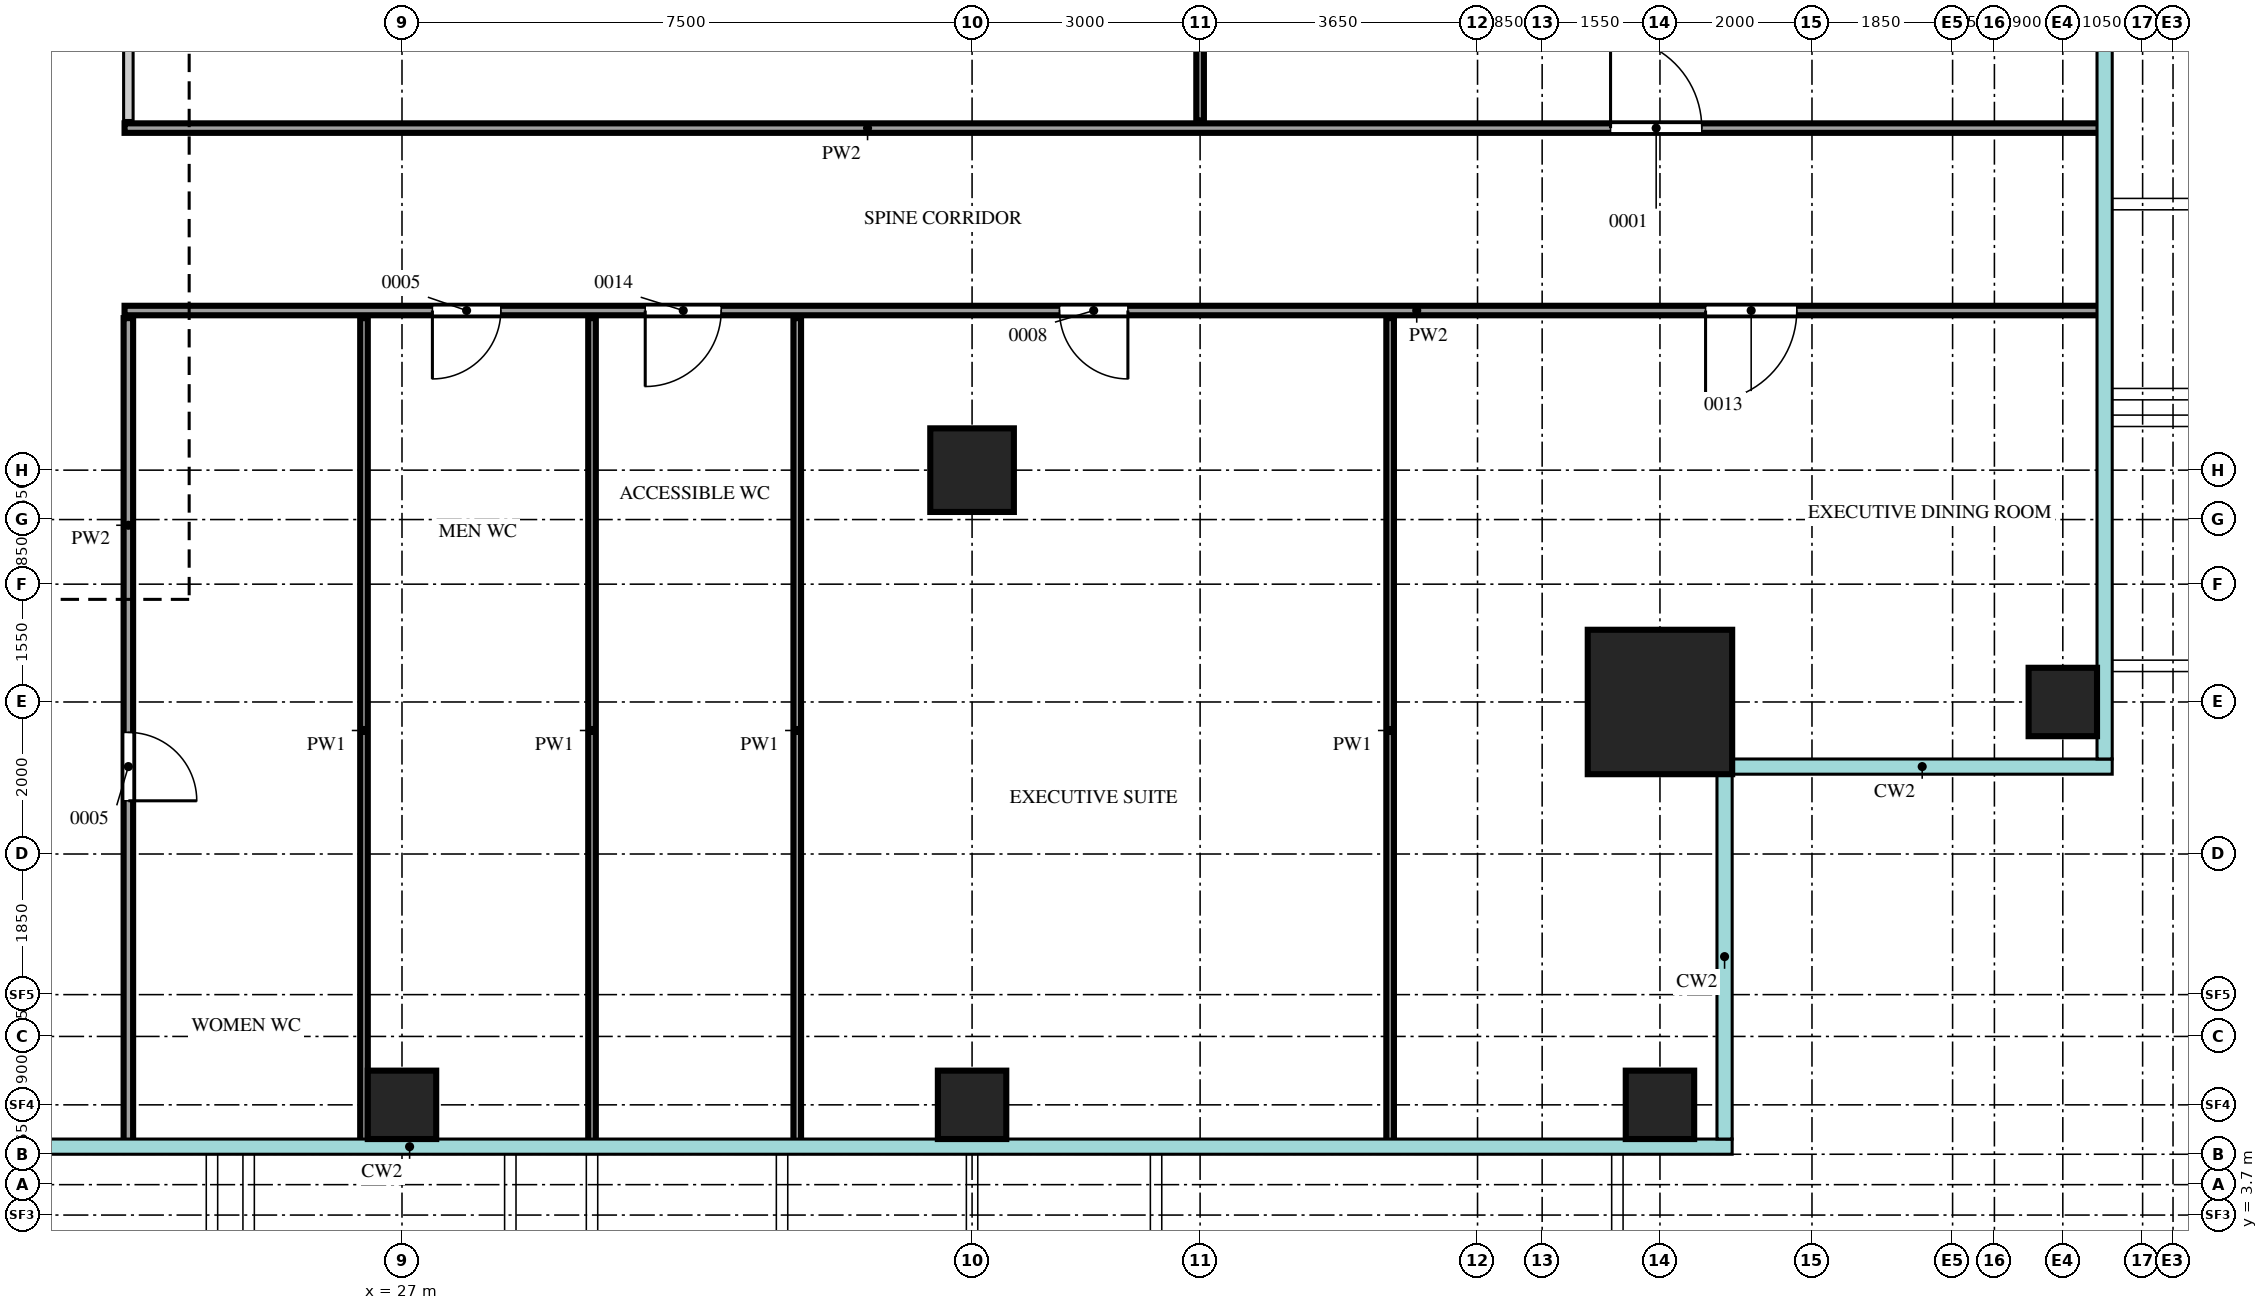
"""IFC4 building model, lengths in metres.
Left out: names, types, materials, properties, quantities, classifications, styles, units other than length and angle.
Written with IfcOpenShell. Run it as: python <this file> out.ifc"""

import sys

from ifc_helpers import new_model, si_unit, direction, frame, frame_2d, origin, origin_2d, place, context, subcontext, project, spatial, rectangle, extrude, source, transform, mapped, element, fill, save


model = new_model("IFC4")
c1 = context("Model", 3, precision=1e-05, world=origin(), true_north=direction((0.0, 1.0)))
c2 = subcontext(c1, "Body", "Model", "MODEL_VIEW")
j1 = project(units=[si_unit("LENGTHUNIT", "METRE"), si_unit("PLANEANGLEUNIT", "RADIAN")], contexts=[c1])
p1 = place(None, origin())
s1 = spatial("IfcSite", under=j1, at=p1, CompositionType="ELEMENT")
p2 = place(p1, origin())
s2 = spatial("IfcBuilding", under=s1, at=p2, CompositionType="ELEMENT")
p3 = place(p2, frame((0.0, 0.0, 266.2)))
s3 = spatial("IfcBuildingStorey", under=s2, at=p3, CompositionType="ELEMENT", Elevation=266.2)
m1 = source(origin(), c2, "Body", "SweptSolid", [
    extrude(rectangle(XDim=1.9, YDim=1.9, at=origin_2d()), origin(), (0.0, 0.0, 1.0), 4.0),
])
p4 = place(p3, frame((43.55, 10.45, 0.0), z_axis=(0.0, 0.0, 1.0), x_axis=(1.0, 0.0, 0.0)))
e1 = element("IfcColumn", 1, at=p4, inside=s3, PredefinedType="COLUMN", context=c2, shape_type="MappedRepresentation", body=[
    mapped(m1, transform((0.0, 0.0, 0.0))),
])
m2 = source(origin(), c2, "Body", "SweptSolid", [
    extrude(rectangle(XDim=0.9, YDim=0.9, at=origin_2d()), origin(), (0.0, 0.0, 1.0), 3.75),
])
for number, where, z_axis, x_axis in (
    (2, (27.0, 5.15, 0.0), (0.0, 0.0, 1.0), (1.0, 0.0, 0.0)),
    (3, (34.5, 5.15, 0.0), (0.0, 0.0, 1.0), (1.0, 0.0, 0.0)),
    (4, (43.55, 5.15, 0.0), (0.0, 0.0, 1.0), (1.0, 0.0, 0.0)),
    (5, (48.85, 10.45, 0.0), (0.0, 0.0, 1.0), (1.0, 0.0, 0.0)),
):
    element("IfcColumn", number, at=place(p3, frame(where, z_axis=z_axis, x_axis=x_axis)), inside=s3, PredefinedType="COLUMN", context=c2, shape_type="MappedRepresentation", body=[
        mapped(m2, transform((0.0, 0.0, 0.0))),
    ])
m3 = source(origin(), c2, "Body", "SweptSolid", [
    extrude(rectangle(XDim=1.1, YDim=1.1, at=origin_2d()), origin(), (0.0, 0.0, 1.0), 3.75),
])
p5 = place(p3, frame((34.5, 13.5, 0.0), z_axis=(0.0, 0.0, 1.0), x_axis=(1.0, 0.0, 0.0)))
e6 = element("IfcColumn", 6, at=p5, inside=s3, PredefinedType="COLUMN", context=c2, shape_type="MappedRepresentation", body=[
    mapped(m3, transform((0.0, 0.0, 0.0))),
])
m4 = source(origin(), c2, "Body", "SweptSolid", [
    extrude(rectangle(XDim=10.85, YDim=0.125, at=frame_2d((5.425, 0.0))), origin(), (0.0, 0.0, 1.0), 3.8),
])
p6 = place(p3, frame((23.4, 4.65, 0.0), z_axis=(0.0, 0.0, 1.0), x_axis=(0.0, 1.0, 0.0)))
e7 = element("IfcWall", 7, at=p6, inside=s3, PredefinedType="PARTITIONING", context=c2, shape_type="MappedRepresentation", body=[
    mapped(m4, transform((0.0, 0.0, 0.0))),
])
m5 = source(origin(), c2, "Body", "SweptSolid", [
    extrude(rectangle(XDim=0.9, YDim=2.1, at=frame_2d((0.45, 1.05))), frame((0.0, 0.073, 0.0), z_axis=(0.0, -1.0, 0.0), x_axis=(1.0, 0.0, 0.0)), (0.0, 0.0, 1.0), 0.145),
])
p7 = place(p6, frame((4.5, 0.0, 0.0)))
e8 = element("IfcOpeningElement", 8, at=p7, cuts=e7, PredefinedType="OPENING", context=c2, shape_type="MappedRepresentation", body=[
    mapped(m5, transform((0.0, 0.0, 0.0))),
])
m6 = source(origin(), c2, "Body", "SweptSolid", [
    extrude(rectangle(XDim=10.85, YDim=0.1, at=frame_2d((5.425, 0.0))), origin(), (0.0, 0.0, 1.0), 3.8),
])
for number, where, z_axis, x_axis in (
    (9, (26.5, 4.65, 0.0), (0.0, 0.0, 1.0), (0.0, 1.0, 0.0)),
    (10, (29.5, 4.65, 0.0), (0.0, 0.0, 1.0), (0.0, 1.0, 0.0)),
    (11, (32.2, 4.65, 0.0), (0.0, 0.0, 1.0), (0.0, 1.0, 0.0)),
    (12, (40.0, 4.65, 0.0), (0.0, 0.0, 1.0), (0.0, 1.0, 0.0)),
):
    element("IfcWall", number, at=place(p3, frame(where, z_axis=z_axis, x_axis=x_axis)), inside=s3, PredefinedType="PARTITIONING", context=c2, shape_type="MappedRepresentation", body=[
        mapped(m6, transform((0.0, 0.0, 0.0))),
    ])
m7 = source(origin(), c2, "Body", "SweptSolid", [
    extrude(rectangle(XDim=26.0, YDim=0.125, at=frame_2d((13.0, 0.0))), origin(), (0.0, 0.0, 1.0), 3.8),
])
p8 = place(p3, frame((23.35, 15.6, 0.0), z_axis=(0.0, 0.0, 1.0), x_axis=(1.0, 0.0, 0.0)))
e13 = element("IfcWall", 13, at=p8, inside=s3, PredefinedType="PARTITIONING", context=c2, shape_type="MappedRepresentation", body=[
    mapped(m7, transform((0.0, 0.0, 0.0))),
])
p9 = place(p8, frame((4.05, 0.0, 0.0)))
e14 = element("IfcOpeningElement", 14, at=p9, cuts=e13, PredefinedType="OPENING", context=c2, shape_type="MappedRepresentation", body=[
    mapped(m5, transform((0.0, 0.0, 0.0))),
])
m8 = source(origin(), c2, "Body", "SweptSolid", [
    extrude(rectangle(XDim=1.0, YDim=2.1, at=frame_2d((0.5, 1.05))), frame((0.0, 0.073, 0.0), z_axis=(0.0, -1.0, 0.0), x_axis=(1.0, 0.0, 0.0)), (0.0, 0.0, 1.0), 0.145),
])
p10 = place(p8, frame((6.85, 0.0, 0.0)))
e15 = element("IfcOpeningElement", 15, at=p10, cuts=e13, PredefinedType="OPENING", context=c2, shape_type="MappedRepresentation", body=[
    mapped(m8, transform((0.0, 0.0, 0.0))),
])
p11 = place(p8, frame((12.3, 0.0, 0.0)))
e16 = element("IfcOpeningElement", 16, at=p11, cuts=e13, PredefinedType="OPENING", context=c2, shape_type="MappedRepresentation", body=[
    mapped(m5, transform((0.0, 0.0, 0.0))),
])
m9 = source(origin(), c2, "Body", "SweptSolid", [
    extrude(rectangle(XDim=1.2, YDim=2.1, at=frame_2d((0.6, 1.05))), frame((0.0, 0.073, 0.0), z_axis=(0.0, -1.0, 0.0), x_axis=(1.0, 0.0, 0.0)), (0.0, 0.0, 1.0), 0.145),
])
p12 = place(p8, frame((20.8, 0.0, 0.0)))
e17 = element("IfcOpeningElement", 17, at=p12, cuts=e13, PredefinedType="OPENING", context=c2, shape_type="MappedRepresentation", body=[
    mapped(m9, transform((0.0, 0.0, 0.0))),
])
p13 = place(p3, frame((23.35, 18.0, 0.0), z_axis=(0.0, 0.0, 1.0), x_axis=(1.0, 0.0, 0.0)))
e18 = element("IfcWall", 18, at=p13, inside=s3, PredefinedType="PARTITIONING", context=c2, shape_type="MappedRepresentation", body=[
    mapped(m7, transform((0.0, 0.0, 0.0))),
])
p14 = place(p13, frame((19.55, 0.0, 0.0)))
e19 = element("IfcOpeningElement", 19, at=p14, cuts=e18, PredefinedType="OPENING", context=c2, shape_type="MappedRepresentation", body=[
    mapped(m9, transform((0.0, 0.0, 0.0))),
])
m10 = source(origin(), c2, "Body", "SweptSolid", [
    extrude(rectangle(XDim=18.4, YDim=0.125, at=frame_2d((9.2, 0.0))), origin(), (0.0, 0.0, 1.0), 3.8),
])
p15 = place(p3, frame((23.4, 18.1, 0.0), z_axis=(0.0, 0.0, 1.0), x_axis=(0.0, 1.0, 0.0)))
e20 = element("IfcWall", 20, at=p15, inside=s3, PredefinedType="PARTITIONING", context=c2, shape_type="MappedRepresentation", body=[
    mapped(m10, transform((0.0, 0.0, 0.0))),
])
p16 = place(p15, frame((8.6, 0.0, 0.0)))
e21 = element("IfcOpeningElement", 21, at=p16, cuts=e20, PredefinedType="OPENING", context=c2, shape_type="MappedRepresentation", body=[
    mapped(m9, transform((0.0, 0.0, 0.0))),
])
m11 = source(origin(), c2, "Body", "SweptSolid", [
    extrude(rectangle(XDim=18.4, YDim=0.1, at=frame_2d((9.2, 0.0))), origin(), (0.0, 0.0, 1.0), 3.8),
])
p17 = place(p3, frame((37.5, 18.1, 0.0), z_axis=(0.0, 0.0, 1.0), x_axis=(0.0, 1.0, 0.0)))
e22 = element("IfcWall", 22, at=p17, inside=s3, PredefinedType="PARTITIONING", context=c2, shape_type="MappedRepresentation", body=[
    mapped(m11, transform((0.0, 0.0, 0.0))),
])
m12 = source(origin(), c2, "Body", "SweptSolid", [
    extrude(rectangle(XDim=0.9, YDim=2.1, at=frame_2d((0.45, 1.05))), frame((0.0, 0.025, 0.0), z_axis=(0.0, -1.0, 0.0), x_axis=(1.0, 0.0, 0.0)), (0.0, 0.0, 1.0), 0.05),
])
p18 = place(p7, origin())
e23 = element("IfcDoor", 23, at=p18, inside=s3, OperationType="SINGLE_SWING_LEFT", PredefinedType="DOOR", context=c2, shape_type="MappedRepresentation", body=[
    mapped(m12, transform((0.0, 0.0, 0.0))),
])
fill(e8, e23)
p19 = place(p9, origin())
e24 = element("IfcDoor", 24, at=p19, inside=s3, OperationType="SINGLE_SWING_LEFT", PredefinedType="DOOR", context=c2, shape_type="MappedRepresentation", body=[
    mapped(m12, transform((0.0, 0.0, 0.0))),
])
fill(e14, e24)
m13 = source(origin(), c2, "Body", "SweptSolid", [
    extrude(rectangle(XDim=1.0, YDim=2.1, at=frame_2d((0.5, 1.05))), frame((0.0, 0.025, 0.0), z_axis=(0.0, -1.0, 0.0), x_axis=(1.0, 0.0, 0.0)), (0.0, 0.0, 1.0), 0.05),
])
p20 = place(p10, origin())
e25 = element("IfcDoor", 25, at=p20, inside=s3, OperationType="SINGLE_SWING_LEFT", PredefinedType="DOOR", context=c2, shape_type="MappedRepresentation", body=[
    mapped(m13, transform((0.0, 0.0, 0.0))),
])
fill(e15, e25)
p21 = place(p11, origin())
e26 = element("IfcDoor", 26, at=p21, inside=s3, OperationType="SINGLE_SWING_RIGHT", PredefinedType="DOOR", context=c2, shape_type="MappedRepresentation", body=[
    mapped(m12, transform((0.0, 0.0, 0.0))),
])
fill(e16, e26)
m14 = source(origin(), c2, "Body", "SweptSolid", [
    extrude(rectangle(XDim=1.2, YDim=2.1, at=frame_2d((0.6, 1.05))), frame((0.0, 0.025, 0.0), z_axis=(0.0, -1.0, 0.0), x_axis=(1.0, 0.0, 0.0)), (0.0, 0.0, 1.0), 0.05),
])
p22 = place(p12, origin())
e27 = element("IfcDoor", 27, at=p22, inside=s3, OperationType="SINGLE_SWING_LEFT", PredefinedType="DOOR", context=c2, shape_type="MappedRepresentation", body=[
    mapped(m14, transform((0.0, 0.0, 0.0))),
])
fill(e17, e27)
p23 = place(p14, origin())
e28 = element("IfcDoor", 28, at=p23, inside=s3, OperationType="SINGLE_SWING_RIGHT", PredefinedType="DOOR", context=c2, shape_type="MappedRepresentation", body=[
    mapped(m14, transform((0.0, 0.0, 0.0))),
])
fill(e19, e28)
save(model, sys.argv[1])
